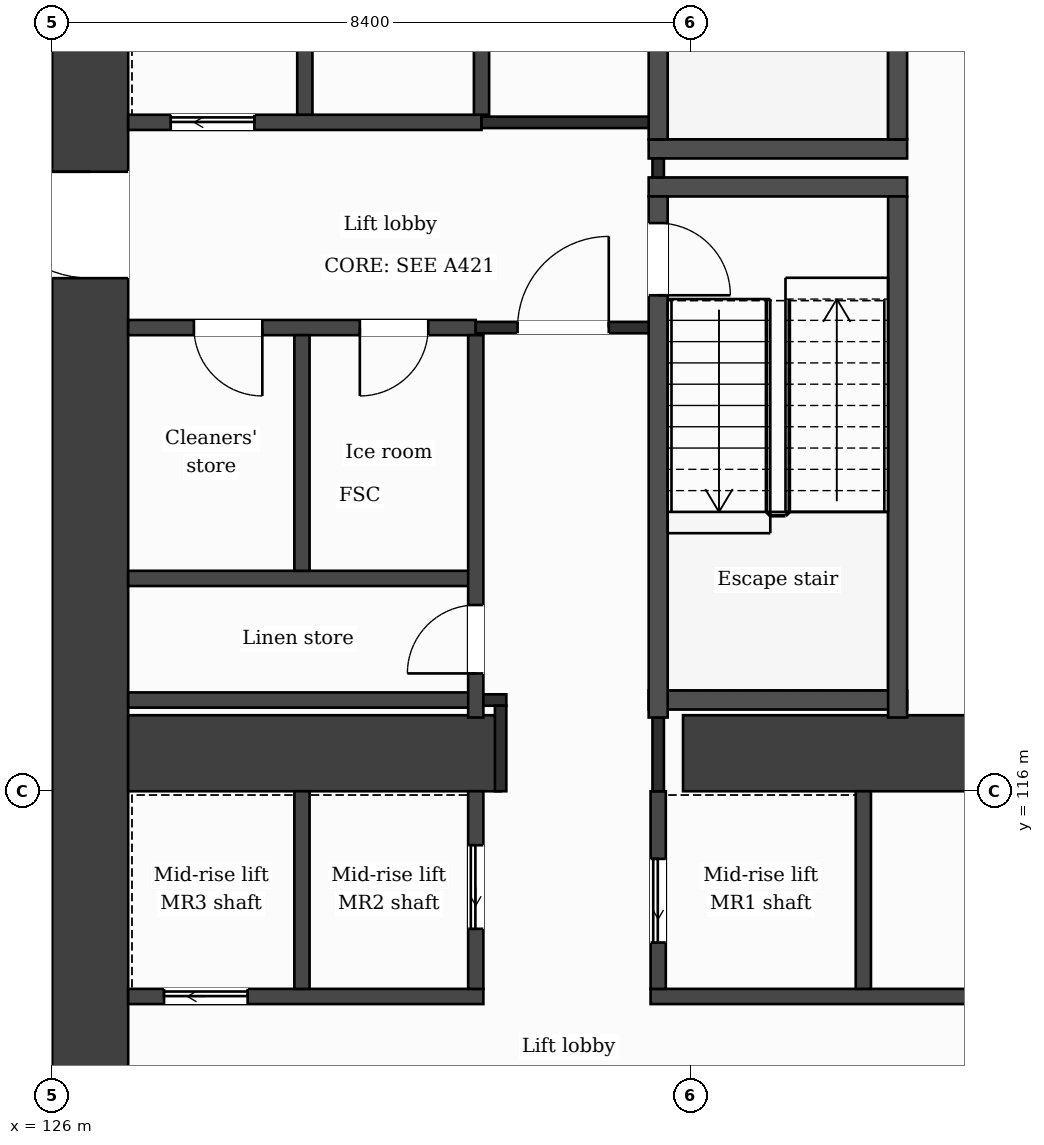
"""IFC4 building model, lengths in metres.
Left out: names, types, materials, properties, quantities, classifications, styles, units other than length and angle.
Written with IfcOpenShell. Run it as: python <this file> out.ifc"""

import sys

from ifc_helpers import new_model, si_unit, direction, frame, frame_2d, origin, place, context, subcontext, project, spatial, rectangle, extrude, element, fill, save


model = new_model("IFC4")
c1 = context("Model", 3, precision=1e-05, world=origin(), true_north=direction((0.0, 1.0)))
c2 = subcontext(c1, "Body", "Model", "MODEL_VIEW")
j1 = project(units=[si_unit("LENGTHUNIT", "METRE"), si_unit("PLANEANGLEUNIT", "RADIAN")], contexts=[c1])
p1 = place(None, origin())
s1 = spatial("IfcSite", under=j1, at=p1, CompositionType="ELEMENT")
p2 = place(p1, origin())
s2 = spatial("IfcBuilding", under=s1, at=p2, CompositionType="ELEMENT")
p3 = place(p2, frame((0.0, 0.0, 91.0)))
s3 = spatial("IfcBuildingStorey", under=s2, at=p3, CompositionType="ELEMENT", Elevation=91.0)
p4 = place(p3, frame((137.732, 131.9, 0.0), z_axis=(0.0, 0.0, 1.0), x_axis=(0.133411141623, -0.991060778808, 0.0)))
e1 = element("IfcWall", 1, at=p4, inside=s3, PredefinedType="SHEAR", context=c2, shape_type="SweptSolid", body=[
    extrude(rectangle(XDim=21.189, YDim=1.0, at=frame_2d((10.595, 0.0))), origin(), (0.0, 0.0, 1.0), 3.7),
])
p5 = place(p3, frame((126.5, 110.9, 0.0), z_axis=(0.0, 0.0, 1.0), x_axis=(0.0, 1.0, 0.0)))
e2 = element("IfcWall", 2, at=p5, inside=s3, PredefinedType="SHEAR", context=c2, shape_type="SweptSolid", body=[
    extrude(rectangle(XDim=21.0, YDim=1.0, at=frame_2d((10.5, 0.0))), origin(), (0.0, 0.0, 1.0), 3.7),
])
p6 = place(p5, frame((11.85, 0.0, 0.0)))
e3 = element("IfcOpeningElement", 3, at=p6, cuts=e2, PredefinedType="OPENING", context=c2, shape_type="SweptSolid", body=[
    extrude(rectangle(XDim=1.4, YDim=2.1, at=frame_2d((0.7, 1.05))), frame((0.0, 0.51, 0.0), z_axis=(0.0, -1.0, 0.0), x_axis=(1.0, 0.0, 0.0)), (0.0, 0.0, 1.0), 1.02),
])
p7 = place(p3, frame((127.0, 116.5, 0.0), z_axis=(0.0, 0.0, 1.0), x_axis=(1.0, 0.0, 0.0)))
e4 = element("IfcWall", 4, at=p7, inside=s3, PredefinedType="SHEAR", context=c2, shape_type="SweptSolid", body=[
    extrude(rectangle(XDim=4.9, YDim=1.0, at=frame_2d((2.45, 0.0))), origin(), (0.0, 0.0, 1.0), 3.7),
])
p8 = place(p3, frame((134.3, 116.5, 0.0), z_axis=(0.0, 0.0, 1.0), x_axis=(1.0, 0.0, 0.0)))
e5 = element("IfcWall", 5, at=p8, inside=s3, PredefinedType="SHEAR", context=c2, shape_type="SweptSolid", body=[
    extrude(rectangle(XDim=5.077, YDim=1.0, at=frame_2d((2.539, 0.0))), origin(), (0.0, 0.0, 1.0), 3.7),
])
p9 = place(p3, frame((127.0, 113.3, 0.0), z_axis=(0.0, 0.0, 1.0), x_axis=(1.0, 0.0, 0.0)))
e6 = element("IfcWall", 6, at=p9, inside=s3, PredefinedType="PARTITIONING", context=c2, shape_type="SweptSolid", body=[
    extrude(rectangle(XDim=4.673, YDim=0.2, at=frame_2d((2.336, 0.0))), origin(), (0.0, 0.0, 1.0), 3.38),
])
p10 = place(p9, frame((0.472, 0.0, 0.0)))
e7 = element("IfcOpeningElement", 7, at=p10, cuts=e6, PredefinedType="OPENING", context=c2, shape_type="SweptSolid", body=[
    extrude(rectangle(XDim=1.1, YDim=2.1, at=frame_2d((0.55, 1.05))), frame((0.0, 0.11, 0.0), z_axis=(0.0, -1.0, 0.0), x_axis=(1.0, 0.0, 0.0)), (0.0, 0.0, 1.0), 0.22),
])
p11 = place(p3, frame((133.873, 113.3, 0.0), z_axis=(0.0, 0.0, 1.0), x_axis=(1.0, 0.0, 0.0)))
e8 = element("IfcWall", 8, at=p11, inside=s3, PredefinedType="PARTITIONING", context=c2, shape_type="SweptSolid", body=[
    extrude(rectangle(XDim=5.888, YDim=0.2, at=frame_2d((2.944, 0.0))), origin(), (0.0, 0.0, 1.0), 3.38),
])
p12 = place(p3, frame((127.0, 117.2, 0.0), z_axis=(0.0, 0.0, 1.0), x_axis=(1.0, 0.0, 0.0)))
e9 = element("IfcWall", 9, at=p12, inside=s3, PredefinedType="PARTITIONING", context=c2, shape_type="SweptSolid", body=[
    extrude(rectangle(XDim=4.573, YDim=0.2, at=frame_2d((2.287, 0.0))), origin(), (0.0, 0.0, 1.0), 3.38),
])
p13 = place(p3, frame((131.573, 117.2, 0.0), z_axis=(0.0, 0.0, 1.0), x_axis=(1.0, 0.0, 0.0)))
e10 = element("IfcWall", 10, at=p13, inside=s3, PredefinedType="PARTITIONING", context=c2, shape_type="SweptSolid", body=[
    extrude(rectangle(XDim=0.402, YDim=0.15, at=frame_2d((0.201, 0.0))), origin(), (0.0, 0.0, 1.0), 3.38),
])
p14 = place(p3, frame((133.848, 117.2, 0.0), z_axis=(0.0, 0.0, 1.0), x_axis=(1.0, 0.0, 0.0)))
e11 = element("IfcWall", 11, at=p14, inside=s3, PredefinedType="PARTITIONING", context=c2, shape_type="SweptSolid", body=[
    extrude(rectangle(XDim=3.4, YDim=0.25, at=frame_2d((1.7, 0.0))), origin(), (0.0, 0.0, 1.0), 3.38),
])
p15 = place(p3, frame((127.0, 118.8, 0.0), z_axis=(0.0, 0.0, 1.0), x_axis=(1.0, 0.0, 0.0)))
e12 = element("IfcWall", 12, at=p15, inside=s3, PredefinedType="PARTITIONING", context=c2, shape_type="SweptSolid", body=[
    extrude(rectangle(XDim=4.573, YDim=0.2, at=frame_2d((2.287, 0.0))), origin(), (0.0, 0.0, 1.0), 3.38),
])
p16 = place(p3, frame((127.0, 122.1, 0.0), z_axis=(0.0, 0.0, 1.0), x_axis=(1.0, 0.0, 0.0)))
e13 = element("IfcWall", 13, at=p16, inside=s3, PredefinedType="PARTITIONING", context=c2, shape_type="SweptSolid", body=[
    extrude(rectangle(XDim=4.573, YDim=0.2, at=frame_2d((2.287, 0.0))), origin(), (0.0, 0.0, 1.0), 3.38),
])
p17 = place(p16, frame((3.048, 0.0, 0.0)))
e14 = element("IfcOpeningElement", 14, at=p17, cuts=e13, PredefinedType="OPENING", context=c2, shape_type="SweptSolid", body=[
    extrude(rectangle(XDim=0.9, YDim=2.1, at=frame_2d((0.45, 1.05))), frame((0.0, 0.11, 0.0), z_axis=(0.0, -1.0, 0.0), x_axis=(1.0, 0.0, 0.0)), (0.0, 0.0, 1.0), 0.22),
])
p18 = place(p16, frame((0.865, 0.0, 0.0)))
e15 = element("IfcOpeningElement", 15, at=p18, cuts=e13, PredefinedType="OPENING", context=c2, shape_type="SweptSolid", body=[
    extrude(rectangle(XDim=0.9, YDim=2.1, at=frame_2d((0.45, 1.05))), frame((0.0, 0.11, 0.0), z_axis=(0.0, -1.0, 0.0), x_axis=(1.0, 0.0, 0.0)), (0.0, 0.0, 1.0), 0.22),
])
p19 = place(p3, frame((131.573, 122.1, 0.0), z_axis=(0.0, 0.0, 1.0), x_axis=(1.0, 0.0, 0.0)))
e16 = element("IfcWall", 16, at=p19, inside=s3, PredefinedType="PARTITIONING", context=c2, shape_type="SweptSolid", body=[
    extrude(rectangle(XDim=2.4, YDim=0.15, at=frame_2d((1.2, 0.0))), origin(), (0.0, 0.0, 1.0), 3.38),
])
p20 = place(p19, frame((0.55, 0.0, 0.0)))
e17 = element("IfcOpeningElement", 17, at=p20, cuts=e16, PredefinedType="OPENING", context=c2, shape_type="SweptSolid", body=[
    extrude(rectangle(XDim=1.2, YDim=2.1, at=frame_2d((0.6, 1.05))), frame((0.0, 0.085, 0.0), z_axis=(0.0, -1.0, 0.0), x_axis=(1.0, 0.0, 0.0)), (0.0, 0.0, 1.0), 0.17),
])
p21 = place(p3, frame((100.8, 122.45, 0.0), z_axis=(0.0, 0.0, 1.0), x_axis=(1.0, 0.0, 0.0)))
e18 = element("IfcWall", 18, at=p21, inside=s3, PredefinedType="PARTITIONING", context=c2, shape_type="SweptSolid", body=[
    extrude(rectangle(XDim=25.2, YDim=0.15, at=frame_2d((12.6, 0.0))), origin(), (0.0, 0.0, 1.0), 3.38),
])
for number, where, z_axis, x_axis in (
    (19, (133.848, 123.95, 0.0), (0.0, 0.0, 1.0), (1.0, 0.0, 0.0)),
    (20, (133.848, 124.45, 0.0), (0.0, 0.0, 1.0), (1.0, 0.0, 0.0)),
):
    element("IfcWall", number, at=place(p3, frame(where, z_axis=z_axis, x_axis=x_axis)), inside=s3, PredefinedType="PARTITIONING", context=c2, shape_type="SweptSolid", body=[
        extrude(rectangle(XDim=3.4, YDim=0.25, at=frame_2d((1.7, 0.0))), origin(), (0.0, 0.0, 1.0), 3.38),
    ])
p22 = place(p3, frame((100.8, 124.45, 0.0), z_axis=(0.0, 0.0, 1.0), x_axis=(1.0, 0.0, 0.0)))
e21 = element("IfcWall", 21, at=p22, inside=s3, PredefinedType="PARTITIONING", context=c2, shape_type="SweptSolid", body=[
    extrude(rectangle(XDim=25.2, YDim=0.15, at=frame_2d((12.6, 0.0))), origin(), (0.0, 0.0, 1.0), 3.38),
])
p23 = place(p22, frame((1.6, 0.0, 0.0)))
e22 = element("IfcOpeningElement", 22, at=p23, cuts=e21, PredefinedType="OPENING", context=c2, shape_type="SweptSolid", body=[
    extrude(rectangle(XDim=1.0, YDim=2.1, at=frame_2d((0.5, 1.05))), frame((0.0, 0.085, 0.0), z_axis=(0.0, -1.0, 0.0), x_axis=(1.0, 0.0, 0.0)), (0.0, 0.0, 1.0), 0.17),
])
p24 = place(p22, frame((5.525, 0.0, 0.0)))
e23 = element("IfcOpeningElement", 23, at=p24, cuts=e21, PredefinedType="OPENING", context=c2, shape_type="SweptSolid", body=[
    extrude(rectangle(XDim=1.0, YDim=2.1, at=frame_2d((0.5, 1.05))), frame((0.0, 0.085, 0.0), z_axis=(0.0, -1.0, 0.0), x_axis=(1.0, 0.0, 0.0)), (0.0, 0.0, 1.0), 0.17),
])
p25 = place(p22, frame((9.375, 0.0, 0.0)))
e24 = element("IfcOpeningElement", 24, at=p25, cuts=e21, PredefinedType="OPENING", context=c2, shape_type="SweptSolid", body=[
    extrude(rectangle(XDim=1.0, YDim=2.1, at=frame_2d((0.5, 1.05))), frame((0.0, 0.085, 0.0), z_axis=(0.0, -1.0, 0.0), x_axis=(1.0, 0.0, 0.0)), (0.0, 0.0, 1.0), 0.17),
])
p26 = place(p22, frame((14.2, 0.0, 0.0)))
e25 = element("IfcOpeningElement", 25, at=p26, cuts=e21, PredefinedType="OPENING", context=c2, shape_type="SweptSolid", body=[
    extrude(rectangle(XDim=1.0, YDim=2.1, at=frame_2d((0.5, 1.05))), frame((0.0, 0.085, 0.0), z_axis=(0.0, -1.0, 0.0), x_axis=(1.0, 0.0, 0.0)), (0.0, 0.0, 1.0), 0.17),
])
p27 = place(p22, frame((18.825, 0.0, 0.0)))
e26 = element("IfcOpeningElement", 26, at=p27, cuts=e21, PredefinedType="OPENING", context=c2, shape_type="SweptSolid", body=[
    extrude(rectangle(XDim=1.0, YDim=2.1, at=frame_2d((0.5, 1.05))), frame((0.0, 0.085, 0.0), z_axis=(0.0, -1.0, 0.0), x_axis=(1.0, 0.0, 0.0)), (0.0, 0.0, 1.0), 0.17),
])
p28 = place(p3, frame((127.0, 124.8, 0.0), z_axis=(0.0, 0.0, 1.0), x_axis=(1.0, 0.0, 0.0)))
e27 = element("IfcWall", 27, at=p28, inside=s3, PredefinedType="PARTITIONING", context=c2, shape_type="SweptSolid", body=[
    extrude(rectangle(XDim=4.649, YDim=0.2, at=frame_2d((2.324, 0.0))), origin(), (0.0, 0.0, 1.0), 3.38),
])
p29 = place(p28, frame((0.56, 0.0, 0.0)))
e28 = element("IfcOpeningElement", 28, at=p29, cuts=e27, PredefinedType="OPENING", context=c2, shape_type="SweptSolid", body=[
    extrude(rectangle(XDim=1.1, YDim=2.1, at=frame_2d((0.55, 1.05))), frame((0.0, 0.11, 0.0), z_axis=(0.0, -1.0, 0.0), x_axis=(1.0, 0.0, 0.0)), (0.0, 0.0, 1.0), 0.22),
])
p30 = place(p3, frame((131.649, 124.8, 0.0), z_axis=(0.0, 0.0, 1.0), x_axis=(1.0, 0.0, 0.0)))
e29 = element("IfcWall", 29, at=p30, inside=s3, PredefinedType="PARTITIONING", context=c2, shape_type="SweptSolid", body=[
    extrude(rectangle(XDim=2.449, YDim=0.15, at=frame_2d((1.225, 0.0))), origin(), (0.0, 0.0, 1.0), 3.38),
])
p31 = place(p3, frame((129.287, 113.4, 0.0), z_axis=(0.0, 0.0, 1.0), x_axis=(0.0, 1.0, 0.0)))
e30 = element("IfcWall", 30, at=p31, inside=s3, PredefinedType="PARTITIONING", context=c2, shape_type="SweptSolid", body=[
    extrude(rectangle(XDim=2.6, YDim=0.2, at=frame_2d((1.3, 0.0))), origin(), (0.0, 0.0, 1.0), 3.38),
])
for number, where, z_axis, x_axis in (
    (31, (129.287, 118.9, 0.0), (0.0, 0.0, 1.0), (0.0, 1.0, 0.0)),
    (32, (129.324, 124.9, 0.0), (0.0, 0.0, 1.0), (0.0, 1.0, 0.0)),
):
    element("IfcWall", number, at=place(p3, frame(where, z_axis=z_axis, x_axis=x_axis)), inside=s3, PredefinedType="PARTITIONING", context=c2, shape_type="SweptSolid", body=[
        extrude(rectangle(XDim=3.1, YDim=0.2, at=frame_2d((1.55, 0.0))), origin(), (0.0, 0.0, 1.0), 3.38),
    ])
p32 = place(p3, frame((131.573, 113.4, 0.0), z_axis=(0.0, 0.0, 1.0), x_axis=(0.0, 1.0, 0.0)))
e33 = element("IfcWall", 33, at=p32, inside=s3, PredefinedType="PARTITIONING", context=c2, shape_type="SweptSolid", body=[
    extrude(rectangle(XDim=2.6, YDim=0.2, at=frame_2d((1.3, 0.0))), origin(), (0.0, 0.0, 1.0), 3.38),
])
p33 = place(p32, frame((0.79, 0.0, 0.0)))
e34 = element("IfcOpeningElement", 34, at=p33, cuts=e33, PredefinedType="OPENING", context=c2, shape_type="SweptSolid", body=[
    extrude(rectangle(XDim=1.1, YDim=2.1, at=frame_2d((0.55, 1.05))), frame((0.0, 0.11, 0.0), z_axis=(0.0, -1.0, 0.0), x_axis=(1.0, 0.0, 0.0)), (0.0, 0.0, 1.0), 0.22),
])
p34 = place(p3, frame((131.573, 116.97, 0.0), z_axis=(0.0, 0.0, 1.0), x_axis=(0.0, 1.0, 0.0)))
e35 = element("IfcWall", 35, at=p34, inside=s3, PredefinedType="PARTITIONING", context=c2, shape_type="SweptSolid", body=[
    extrude(rectangle(XDim=5.03, YDim=0.2, at=frame_2d((2.515, 0.0))), origin(), (0.0, 0.0, 1.0), 3.38),
])
p35 = place(p34, frame((0.58, 0.0, 0.0)))
e36 = element("IfcOpeningElement", 36, at=p35, cuts=e35, PredefinedType="OPENING", context=c2, shape_type="SweptSolid", body=[
    extrude(rectangle(XDim=0.9, YDim=2.1, at=frame_2d((0.45, 1.05))), frame((0.0, 0.11, 0.0), z_axis=(0.0, -1.0, 0.0), x_axis=(1.0, 0.0, 0.0)), (0.0, 0.0, 1.0), 0.22),
])
p36 = place(p3, frame((131.649, 124.9, 0.0), z_axis=(0.0, 0.0, 1.0), x_axis=(0.0, 1.0, 0.0)))
e37 = element("IfcWall", 37, at=p36, inside=s3, PredefinedType="PARTITIONING", context=c2, shape_type="SweptSolid", body=[
    extrude(rectangle(XDim=3.1, YDim=0.2, at=frame_2d((1.55, 0.0))), origin(), (0.0, 0.0, 1.0), 3.38),
])
p37 = place(p3, frame((131.9, 116.0, 0.0), z_axis=(0.0, 0.0, 1.0), x_axis=(0.0, 1.0, 0.0)))
e38 = element("IfcWall", 38, at=p37, inside=s3, PredefinedType="PARTITIONING", context=c2, shape_type="SweptSolid", body=[
    extrude(rectangle(XDim=1.125, YDim=0.15, at=frame_2d((0.562, 0.0))), origin(), (0.0, 0.0, 1.0), 3.38),
])
p38 = place(p3, frame((133.973, 113.4, 0.0), z_axis=(0.0, 0.0, 1.0), x_axis=(0.0, 1.0, 0.0)))
e39 = element("IfcWall", 39, at=p38, inside=s3, PredefinedType="PARTITIONING", context=c2, shape_type="SweptSolid", body=[
    extrude(rectangle(XDim=2.6, YDim=0.2, at=frame_2d((1.3, 0.0))), origin(), (0.0, 0.0, 1.0), 3.38),
])
p39 = place(p38, frame((0.61, 0.0, 0.0)))
e40 = element("IfcOpeningElement", 40, at=p39, cuts=e39, PredefinedType="OPENING", context=c2, shape_type="SweptSolid", body=[
    extrude(rectangle(XDim=1.1, YDim=2.1, at=frame_2d((0.55, 1.05))), frame((0.0, 0.11, 0.0), z_axis=(0.0, -1.0, 0.0), x_axis=(1.0, 0.0, 0.0)), (0.0, 0.0, 1.0), 0.22),
])
p40 = place(p3, frame((133.973, 116.0, 0.0), z_axis=(0.0, 0.0, 1.0), x_axis=(0.0, 1.0, 0.0)))
e41 = element("IfcWall", 41, at=p40, inside=s3, PredefinedType="PARTITIONING", context=c2, shape_type="SweptSolid", body=[
    extrude(rectangle(XDim=0.97, YDim=0.15, at=frame_2d((0.485, 0.0))), origin(), (0.0, 0.0, 1.0), 3.38),
])
p41 = place(p3, frame((133.973, 124.075, 0.0), z_axis=(0.0, 0.0, 1.0), x_axis=(0.0, 1.0, 0.0)))
e42 = element("IfcWall", 42, at=p41, inside=s3, PredefinedType="PARTITIONING", context=c2, shape_type="SweptSolid", body=[
    extrude(rectangle(XDim=0.25, YDim=0.15, at=frame_2d((0.125, 0.0))), origin(), (0.0, 0.0, 1.0), 3.38),
])
p42 = place(p3, frame((133.973, 116.97, 0.0), z_axis=(0.0, 0.0, 1.0), x_axis=(0.0, 1.0, 0.0)))
e43 = element("IfcWall", 43, at=p42, inside=s3, PredefinedType="PARTITIONING", context=c2, shape_type="SweptSolid", body=[
    extrude(rectangle(XDim=6.855, YDim=0.25, at=frame_2d((3.427, 0.0))), origin(), (0.0, 0.0, 1.0), 3.38),
])
p43 = place(p42, frame((5.555, 0.0, 0.0)))
e44 = element("IfcOpeningElement", 44, at=p43, cuts=e43, PredefinedType="OPENING", context=c2, shape_type="SweptSolid", body=[
    extrude(rectangle(XDim=0.95, YDim=2.1, at=frame_2d((0.475, 1.05))), frame((0.0, 0.135, 0.0), z_axis=(0.0, -1.0, 0.0), x_axis=(1.0, 0.0, 0.0)), (0.0, 0.0, 1.0), 0.27),
])
p44 = place(p3, frame((133.973, 124.575, 0.0), z_axis=(0.0, 0.0, 1.0), x_axis=(0.0, 1.0, 0.0)))
e45 = element("IfcWall", 45, at=p44, inside=s3, PredefinedType="PARTITIONING", context=c2, shape_type="SweptSolid", body=[
    extrude(rectangle(XDim=6.855, YDim=0.25, at=frame_2d((3.427, 0.0))), origin(), (0.0, 0.0, 1.0), 3.38),
])
p45 = place(p44, frame((5.325, 0.0, 0.0)))
e46 = element("IfcOpeningElement", 46, at=p45, cuts=e45, PredefinedType="OPENING", context=c2, shape_type="SweptSolid", body=[
    extrude(rectangle(XDim=1.0, YDim=2.1, at=frame_2d((0.5, 1.05))), frame((0.0, 0.135, 0.0), z_axis=(0.0, -1.0, 0.0), x_axis=(1.0, 0.0, 0.0)), (0.0, 0.0, 1.0), 0.27),
])
p46 = place(p3, frame((136.672, 113.4, 0.0), z_axis=(0.0, 0.0, 1.0), x_axis=(0.0, 1.0, 0.0)))
e47 = element("IfcWall", 47, at=p46, inside=s3, PredefinedType="PARTITIONING", context=c2, shape_type="SweptSolid", body=[
    extrude(rectangle(XDim=2.6, YDim=0.2, at=frame_2d((1.3, 0.0))), origin(), (0.0, 0.0, 1.0), 3.38),
])
for number, where, z_axis, x_axis in (
    (48, (137.123, 116.97, 0.0), (0.0, 0.0, 1.0), (0.0, 1.0, 0.0)),
    (49, (137.123, 124.575, 0.0), (0.0, 0.0, 1.0), (0.0, 1.0, 0.0)),
):
    element("IfcWall", number, at=place(p3, frame(where, z_axis=z_axis, x_axis=x_axis)), inside=s3, PredefinedType="PARTITIONING", context=c2, shape_type="SweptSolid", body=[
        extrude(rectangle(XDim=6.855, YDim=0.25, at=frame_2d((3.427, 0.0))), origin(), (0.0, 0.0, 1.0), 3.38),
    ])
p47 = place(p20, origin())
e50 = element("IfcDoor", 50, at=p47, inside=s3, OperationType="SINGLE_SWING_RIGHT", PredefinedType="DOOR", context=c2, shape_type="SweptSolid", body=[
    extrude(rectangle(XDim=1.2, YDim=2.1, at=frame_2d((0.6, 1.05))), frame((0.0, 0.025, 0.0), z_axis=(0.0, -1.0, 0.0), x_axis=(1.0, 0.0, 0.0)), (0.0, 0.0, 1.0), 0.05),
])
fill(e17, e50)
p48 = place(p29, origin())
e51 = element("IfcDoor", 51, at=p48, inside=s3, OperationType="SLIDING_TO_LEFT", PredefinedType="DOOR", context=c2, shape_type="SweptSolid", body=[
    extrude(rectangle(XDim=1.1, YDim=2.1, at=frame_2d((0.55, 1.05))), frame((0.0, 0.025, 0.0), z_axis=(0.0, -1.0, 0.0), x_axis=(1.0, 0.0, 0.0)), (0.0, 0.0, 1.0), 0.05),
])
fill(e28, e51)
p49 = place(p17, origin())
e52 = element("IfcDoor", 52, at=p49, inside=s3, OperationType="SINGLE_SWING_LEFT", PredefinedType="DOOR", context=c2, shape_type="SweptSolid", body=[
    extrude(rectangle(XDim=0.9, YDim=2.1, at=frame_2d((0.45, 1.05))), frame((0.0, 0.025, 0.0), z_axis=(0.0, -1.0, 0.0), x_axis=(1.0, 0.0, 0.0)), (0.0, 0.0, 1.0), 0.05),
])
fill(e14, e52)
p50 = place(p18, origin())
e53 = element("IfcDoor", 53, at=p50, inside=s3, OperationType="SINGLE_SWING_RIGHT", PredefinedType="DOOR", context=c2, shape_type="SweptSolid", body=[
    extrude(rectangle(XDim=0.9, YDim=2.1, at=frame_2d((0.45, 1.05))), frame((0.0, 0.025, 0.0), z_axis=(0.0, -1.0, 0.0), x_axis=(1.0, 0.0, 0.0)), (0.0, 0.0, 1.0), 0.05),
])
fill(e15, e53)
p51 = place(p43, origin())
e54 = element("IfcDoor", 54, at=p51, inside=s3, OperationType="SINGLE_SWING_LEFT", PredefinedType="DOOR", context=c2, shape_type="SweptSolid", body=[
    extrude(rectangle(XDim=0.95, YDim=2.1, at=frame_2d((0.475, 1.05))), frame((0.0, 0.025, 0.0), z_axis=(0.0, -1.0, 0.0), x_axis=(1.0, 0.0, 0.0)), (0.0, 0.0, 1.0), 0.05),
])
fill(e44, e54)
p52 = place(p35, origin())
e55 = element("IfcDoor", 55, at=p52, inside=s3, OperationType="SINGLE_SWING_LEFT", PredefinedType="DOOR", context=c2, shape_type="SweptSolid", body=[
    extrude(rectangle(XDim=0.9, YDim=2.1, at=frame_2d((0.45, 1.05))), frame((0.0, 0.025, 0.0), z_axis=(0.0, -1.0, 0.0), x_axis=(1.0, 0.0, 0.0)), (0.0, 0.0, 1.0), 0.05),
])
fill(e36, e55)
p53 = place(p39, origin())
e56 = element("IfcDoor", 56, at=p53, inside=s3, OperationType="SLIDING_TO_LEFT", PredefinedType="DOOR", context=c2, shape_type="SweptSolid", body=[
    extrude(rectangle(XDim=1.1, YDim=2.1, at=frame_2d((0.55, 1.05))), frame((0.0, 0.025, 0.0), z_axis=(0.0, -1.0, 0.0), x_axis=(1.0, 0.0, 0.0)), (0.0, 0.0, 1.0), 0.05),
])
fill(e40, e56)
p54 = place(p33, origin())
e57 = element("IfcDoor", 57, at=p54, inside=s3, OperationType="SLIDING_TO_LEFT", PredefinedType="DOOR", context=c2, shape_type="SweptSolid", body=[
    extrude(rectangle(XDim=1.1, YDim=2.1, at=frame_2d((0.55, 1.05))), frame((0.0, 0.025, 0.0), z_axis=(0.0, -1.0, 0.0), x_axis=(1.0, 0.0, 0.0)), (0.0, 0.0, 1.0), 0.05),
])
fill(e34, e57)
p55 = place(p10, origin())
e58 = element("IfcDoor", 58, at=p55, inside=s3, OperationType="SLIDING_TO_LEFT", PredefinedType="DOOR", context=c2, shape_type="SweptSolid", body=[
    extrude(rectangle(XDim=1.1, YDim=2.1, at=frame_2d((0.55, 1.05))), frame((0.0, 0.025, 0.0), z_axis=(0.0, -1.0, 0.0), x_axis=(1.0, 0.0, 0.0)), (0.0, 0.0, 1.0), 0.05),
])
fill(e7, e58)
p56 = place(p6, origin())
e59 = element("IfcDoor", 59, at=p56, inside=s3, OperationType="SINGLE_SWING_RIGHT", PredefinedType="DOOR", context=c2, shape_type="SweptSolid", body=[
    extrude(rectangle(XDim=1.4, YDim=2.1, at=frame_2d((0.7, 1.05))), frame((0.0, 0.025, 0.0), z_axis=(0.0, -1.0, 0.0), x_axis=(1.0, 0.0, 0.0)), (0.0, 0.0, 1.0), 0.05),
])
fill(e3, e59)
save(model, sys.argv[1])
